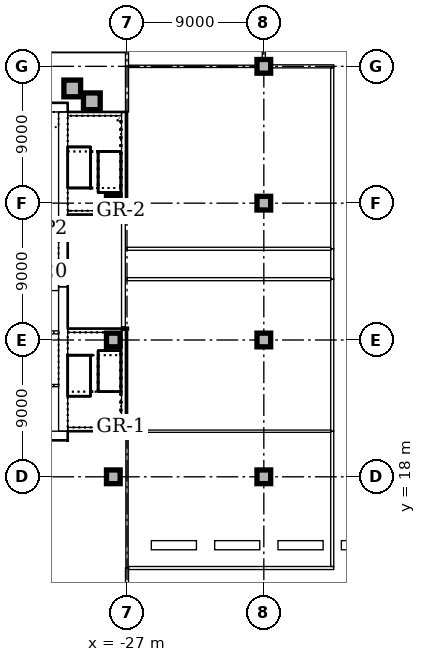
"""IFC4 building model, lengths in metres.
Left out: names, types, materials, properties, quantities, classifications, styles, units other than length and angle.
Written with IfcOpenShell. Run it as: python <this file> out.ifc"""

import sys

from ifc_helpers import new_model, si_unit, direction, frame, frame_2d, origin, origin_2d, place, context, subcontext, project, spatial, rectangle, extrude, element, fill, save


model = new_model("IFC4")
c1 = context("Model", 3, precision=1e-05, world=origin(), true_north=direction((0.0, 1.0)))
c2 = subcontext(c1, "Body", "Model", "MODEL_VIEW")
j1 = project(units=[si_unit("LENGTHUNIT", "METRE"), si_unit("PLANEANGLEUNIT", "RADIAN")], contexts=[c1])
p1 = place(None, origin())
s1 = spatial("IfcSite", under=j1, at=p1, CompositionType="ELEMENT")
p2 = place(p1, origin())
s2 = spatial("IfcBuilding", under=s1, at=p2, CompositionType="ELEMENT")
p3 = place(p2, origin())
s3 = spatial("IfcBuildingStorey", under=s2, at=p3, CompositionType="ELEMENT", Elevation=0.0)
for number, where, z_axis, x_axis in (
    (1, (-42.6, 20.7, 0.0), (0.0, 0.0, 1.0), (1.0, 0.0, 0.0)),
    (2, (-30.9, 42.3, 0.0), (0.0, 0.0, 1.0), (-1.0, 0.0, 0.0)),
):
    element("IfcWall", number, at=place(p3, frame(where, z_axis=z_axis, x_axis=x_axis)), inside=s3, PredefinedType="SOLIDWALL", context=c2, shape_type="SweptSolid", body=[
        extrude(rectangle(XDim=11.7, YDim=0.6, at=frame_2d((5.85, 0.0))), origin(), (0.0, 0.0, 1.0), 6.0),
    ])
p4 = place(p3, frame((-31.2, 21.0, 0.0), z_axis=(0.0, 0.0, 1.0), x_axis=(0.0, 1.0, 0.0)))
e3 = element("IfcWall", 3, at=p4, inside=s3, PredefinedType="SOLIDWALL", context=c2, shape_type="SweptSolid", body=[
    extrude(rectangle(XDim=9.5, YDim=0.6, at=frame_2d((4.75, 0.0))), origin(), (0.0, 0.0, 1.0), 6.0),
])
p5 = place(p4, frame((5.25, 0.0, 0.0)))
e4 = element("IfcOpeningElement", 4, at=p5, cuts=e3, PredefinedType="OPENING", context=c2, shape_type="SweptSolid", body=[
    extrude(rectangle(XDim=1.0, YDim=2.1, at=frame_2d((0.5, 1.05))), frame((0.0, 0.31, 0.0), z_axis=(0.0, -1.0, 0.0), x_axis=(1.0, 0.0, 0.0)), (0.0, 0.0, 1.0), 0.62),
])
p6 = place(p3, frame((-31.2, 30.5, 0.0), z_axis=(0.0, 0.0, 1.0), x_axis=(0.0, 1.0, 0.0)))
e5 = element("IfcWall", 5, at=p6, inside=s3, PredefinedType="SOLIDWALL", context=c2, shape_type="SweptSolid", body=[
    extrude(rectangle(XDim=11.5, YDim=0.6, at=frame_2d((5.75, 0.0))), origin(), (0.0, 0.0, 1.0), 6.0),
])
p7 = place(p6, frame((0.85, 0.0, 0.0)))
e6 = element("IfcOpeningElement", 6, at=p7, cuts=e5, PredefinedType="OPENING", context=c2, shape_type="SweptSolid", body=[
    extrude(rectangle(XDim=1.8, YDim=2.1, at=frame_2d((0.9, 1.05))), frame((0.0, 0.31, 0.0), z_axis=(0.0, -1.0, 0.0), x_axis=(1.0, 0.0, 0.0)), (0.0, 0.0, 1.0), 0.62),
])
p8 = place(p3, frame((-42.0, 30.5, 0.0), z_axis=(0.0, 0.0, 1.0), x_axis=(1.0, 0.0, 0.0)))
e7 = element("IfcWall", 7, at=p8, inside=s3, PredefinedType="SOLIDWALL", context=c2, shape_type="SweptSolid", body=[
    extrude(rectangle(XDim=10.5, YDim=0.5, at=frame_2d((5.25, 0.0))), origin(), (0.0, 0.0, 1.0), 6.0),
])
p9 = place(p3, frame((-30.9, 21.125, 0.0), z_axis=(0.0, 0.0, 1.0), x_axis=(1.0, 0.0, 0.0)))
e8 = element("IfcWall", 8, at=p9, inside=s3, PredefinedType="SOLIDWALL", context=c2, shape_type="SweptSolid", body=[
    extrude(rectangle(XDim=3.54, YDim=0.25, at=frame_2d((1.77, 0.0))), origin(), (0.0, 0.0, 1.0), 6.0),
])
p10 = place(p3, frame((-27.36, 27.625, 0.0), z_axis=(0.0, 0.0, 1.0), x_axis=(-1.0, 0.0, 0.0)))
e9 = element("IfcWall", 9, at=p10, inside=s3, PredefinedType="SOLIDWALL", context=c2, shape_type="SweptSolid", body=[
    extrude(rectangle(XDim=3.54, YDim=0.25, at=frame_2d((1.77, 0.0))), origin(), (0.0, 0.0, 1.0), 6.0),
])
p11 = place(p10, frame((1.69, 0.0, 0.0)))
e10 = element("IfcOpeningElement", 10, at=p11, cuts=e9, PredefinedType="OPENING", context=c2, shape_type="SweptSolid", body=[
    extrude(rectangle(XDim=1.1, YDim=2.1, at=frame_2d((0.55, 1.05))), frame((0.0, 0.135, 0.0), z_axis=(0.0, -1.0, 0.0), x_axis=(1.0, 0.0, 0.0)), (0.0, 0.0, 1.0), 0.27),
])
p12 = place(p3, frame((-30.9, 35.375, 0.0), z_axis=(0.0, 0.0, 1.0), x_axis=(1.0, 0.0, 0.0)))
e11 = element("IfcWall", 11, at=p12, inside=s3, PredefinedType="SOLIDWALL", context=c2, shape_type="SweptSolid", body=[
    extrude(rectangle(XDim=3.54, YDim=0.25, at=frame_2d((1.77, 0.0))), origin(), (0.0, 0.0, 1.0), 6.0),
])
p13 = place(p12, frame((0.75, 0.0, 0.0)))
e12 = element("IfcOpeningElement", 12, at=p13, cuts=e11, PredefinedType="OPENING", context=c2, shape_type="SweptSolid", body=[
    extrude(rectangle(XDim=1.1, YDim=2.1, at=frame_2d((0.55, 1.05))), frame((0.0, 0.135, 0.0), z_axis=(0.0, -1.0, 0.0), x_axis=(1.0, 0.0, 0.0)), (0.0, 0.0, 1.0), 0.27),
])
p14 = place(p3, frame((-27.36, 41.875, 0.0), z_axis=(0.0, 0.0, 1.0), x_axis=(-1.0, 0.0, 0.0)))
e13 = element("IfcWall", 13, at=p14, inside=s3, PredefinedType="SOLIDWALL", context=c2, shape_type="SweptSolid", body=[
    extrude(rectangle(XDim=3.54, YDim=0.25, at=frame_2d((1.77, 0.0))), origin(), (0.0, 0.0, 1.0), 6.0),
])
p15 = place(p3, frame((-27.235, 21.0, 0.0), z_axis=(0.0, 0.0, 1.0), x_axis=(0.0, 1.0, 0.0)))
e14 = element("IfcWall", 14, at=p15, inside=s3, PredefinedType="SOLIDWALL", context=c2, shape_type="SweptSolid", body=[
    extrude(rectangle(XDim=6.65, YDim=0.25, at=frame_2d((3.325, 0.0))), origin(), (0.0, 0.0, 1.0), 6.0),
])
p16 = place(p3, frame((-27.235, 27.85, 0.0), z_axis=(0.0, 0.0, 1.0), x_axis=(0.0, 1.0, 0.0)))
e15 = element("IfcWall", 15, at=p16, inside=s3, PredefinedType="SOLIDWALL", context=c2, shape_type="SweptSolid", body=[
    extrude(rectangle(XDim=7.3, YDim=0.25, at=frame_2d((3.65, 0.0))), origin(), (0.0, 0.0, 1.0), 6.0),
])
p17 = place(p16, frame((3.6, 0.0, 0.0)))
e16 = element("IfcOpeningElement", 16, at=p17, cuts=e15, PredefinedType="OPENING", context=c2, shape_type="SweptSolid", body=[
    extrude(rectangle(XDim=1.1, YDim=2.1, at=frame_2d((0.55, 1.05))), frame((0.0, 0.135, 0.0), z_axis=(0.0, -1.0, 0.0), x_axis=(1.0, 0.0, 0.0)), (0.0, 0.0, 1.0), 0.27),
])
p18 = place(p3, frame((-27.235, 35.35, 0.0), z_axis=(0.0, 0.0, 1.0), x_axis=(0.0, 1.0, 0.0)))
e17 = element("IfcWall", 17, at=p18, inside=s3, PredefinedType="SOLIDWALL", context=c2, shape_type="SweptSolid", body=[
    extrude(rectangle(XDim=6.65, YDim=0.25, at=frame_2d((3.325, 0.0))), origin(), (0.0, 0.0, 1.0), 6.0),
])
for number, where, z_axis, x_axis in (
    (18, (-29.313, 42.7, 0.0), (0.0, 0.0, 1.0), (1.0, 0.0, 0.0)),
    (19, (-30.602, 43.547, 0.0), (0.0, 0.0, 1.0), (1.0, 0.0, 0.0)),
):
    element("IfcColumn", number, at=place(p3, frame(where, z_axis=z_axis, x_axis=x_axis)), inside=s3, PredefinedType="COLUMN", context=c2, shape_type="SweptSolid", body=[
        extrude(rectangle(XDim=1.1, YDim=1.1, at=origin_2d()), origin(), (0.0, 0.0, 1.0), 5.7),
    ])
p19 = place(p3, frame((-27.9, 18.0, 0.0), z_axis=(0.0, 0.0, 1.0), x_axis=(1.0, 0.0, 0.0)))
e20 = element("IfcColumn", 20, at=p19, inside=s3, PredefinedType="COLUMN", context=c2, shape_type="SweptSolid", body=[
    extrude(rectangle(XDim=0.9, YDim=0.9, at=origin_2d()), origin(), (0.0, 0.0, 1.0), 5.7),
])
for number, where, z_axis, x_axis in (
    (21, (-27.9, 27.0, 0.0), (0.0, 0.0, 1.0), (1.0, 0.0, 0.0)),
    (22, (-27.9, 36.0, 0.0), (0.0, 0.0, 1.0), (1.0, 0.0, 0.0)),
):
    element("IfcColumn", number, at=place(p3, frame(where, z_axis=z_axis, x_axis=x_axis)), inside=s3, PredefinedType="COLUMN", context=c2, shape_type="SweptSolid", body=[
        extrude(rectangle(XDim=0.9, YDim=0.9, at=origin_2d()), origin(), (0.0, 0.0, 1.0), 6.0),
    ])
for number, where, z_axis, x_axis in (
    (23, (-18.0, 18.0, 0.0), (0.0, 0.0, 1.0), (1.0, 0.0, 0.0)),
    (24, (-18.0, 27.0, 0.0), (0.0, 0.0, 1.0), (1.0, 0.0, 0.0)),
    (25, (-18.0, 36.0, 0.0), (0.0, 0.0, 1.0), (1.0, 0.0, 0.0)),
    (26, (-18.0, 45.0, 0.0), (0.0, 0.0, 1.0), (1.0, 0.0, 0.0)),
):
    element("IfcColumn", number, at=place(p3, frame(where, z_axis=z_axis, x_axis=x_axis)), inside=s3, PredefinedType="COLUMN", context=c2, shape_type="SweptSolid", body=[
        extrude(rectangle(XDim=0.9, YDim=0.9, at=origin_2d()), origin(), (0.0, 0.0, 1.0), 5.7),
    ])
p20 = place(p3, frame((-26.9, 12.0, 0.0), z_axis=(0.0, 0.0, 1.0), x_axis=(1.0, 0.0, 0.0)))
e27 = element("IfcWall", 27, at=p20, inside=s3, PredefinedType="PARTITIONING", context=c2, shape_type="SweptSolid", body=[
    extrude(rectangle(XDim=13.5, YDim=0.2, at=frame_2d((6.75, 0.0))), origin(), (0.0, 0.0, 1.0), 5.7),
])
p21 = place(p20, frame((1.65, 0.0, 0.0)))
e28 = element("IfcOpeningElement", 28, at=p21, cuts=e27, PredefinedType="OPENING", context=c2, shape_type="SweptSolid", body=[
    extrude(rectangle(XDim=1.0, YDim=2.1, at=frame_2d((0.5, 1.05))), frame((0.0, 0.11, 0.0), z_axis=(0.0, -1.0, 0.0), x_axis=(1.0, 0.0, 0.0)), (0.0, 0.0, 1.0), 0.22),
])
p22 = place(p3, frame((-13.5, 12.1, 0.0), z_axis=(0.0, 0.0, 1.0), x_axis=(0.0, 1.0, 0.0)))
e29 = element("IfcWall", 29, at=p22, inside=s3, PredefinedType="PARTITIONING", context=c2, shape_type="SweptSolid", body=[
    extrude(rectangle(XDim=8.9, YDim=0.2, at=frame_2d((4.45, 0.0))), origin(), (0.0, 0.0, 1.0), 5.7),
])
p23 = place(p3, frame((-27.075, 21.0, 0.0), z_axis=(0.0, 0.0, 1.0), x_axis=(1.0, 0.0, 0.0)))
e30 = element("IfcWall", 30, at=p23, inside=s3, PredefinedType="PARTITIONING", context=c2, shape_type="SweptSolid", body=[
    extrude(rectangle(XDim=13.475, YDim=0.15, at=frame_2d((6.737, 0.0))), origin(), (0.0, 0.0, 1.0), 5.7),
])
p24 = place(p3, frame((-27.0, 12.0, 0.0), z_axis=(0.0, 0.0, 1.0), x_axis=(0.0, 1.0, 0.0)))
e31 = element("IfcWall", 31, at=p24, inside=s3, PredefinedType="PARTITIONING", context=c2, shape_type="SweptSolid", body=[
    extrude(rectangle(XDim=8.925, YDim=0.15, at=frame_2d((4.463, 0.0))), origin(), (0.0, 0.0, 1.0), 5.7),
])
p25 = place(p3, frame((-27.0, 3.7, 0.0), z_axis=(0.0, 0.0, 1.0), x_axis=(0.0, 1.0, 0.0)))
e32 = element("IfcWall", 32, at=p25, inside=s3, PredefinedType="PARTITIONING", context=c2, shape_type="SweptSolid", body=[
    extrude(rectangle(XDim=8.3, YDim=0.2, at=frame_2d((4.15, 0.0))), origin(), (0.0, 0.0, 1.0), 5.7),
])
p26 = place(p3, frame((-26.9, 45.0, 0.0), z_axis=(0.0, 0.0, 1.0), x_axis=(1.0, 0.0, 0.0)))
e33 = element("IfcWall", 33, at=p26, inside=s3, PredefinedType="PARTITIONING", context=c2, shape_type="SweptSolid", body=[
    extrude(rectangle(XDim=8.43, YDim=0.15, at=frame_2d((4.215, 0.0))), origin(), (0.0, 0.0, 1.0), 5.7),
])
p27 = place(p3, frame((-18.0, 45.47, 0.0), z_axis=(0.0, 0.0, 1.0), x_axis=(0.0, 1.0, 0.0)))
e34 = element("IfcWall", 34, at=p27, inside=s3, PredefinedType="PARTITIONING", context=c2, shape_type="SweptSolid", body=[
    extrude(rectangle(XDim=8.06, YDim=0.2, at=frame_2d((4.03, 0.0))), origin(), (0.0, 0.0, 1.0), 5.7),
])
p28 = place(p27, frame((5.03, 0.0, 0.0)))
e35 = element("IfcOpeningElement", 35, at=p28, cuts=e34, PredefinedType="OPENING", context=c2, shape_type="SweptSolid", body=[
    extrude(rectangle(XDim=1.0, YDim=2.1, at=frame_2d((0.5, 1.05))), frame((0.0, 0.11, 0.0), z_axis=(0.0, -1.0, 0.0), x_axis=(1.0, 0.0, 0.0)), (0.0, 0.0, 1.0), 0.22),
])
p29 = place(p3, frame((-27.0, 45.0, 0.0), z_axis=(0.0, 0.0, 1.0), x_axis=(0.0, 1.0, 0.0)))
e36 = element("IfcWall", 36, at=p29, inside=s3, PredefinedType="PARTITIONING", context=c2, shape_type="SweptSolid", body=[
    extrude(rectangle(XDim=1.0, YDim=0.2, at=frame_2d((0.5, 0.0))), origin(), (0.0, 0.0, 1.0), 5.7),
])
p30 = place(p3, frame((-13.5, 21.0, 0.0), z_axis=(0.0, 0.0, 1.0), x_axis=(0.0, 1.0, 0.0)))
e37 = element("IfcWall", 37, at=p30, inside=s3, PredefinedType="PARTITIONING", context=c2, shape_type="SweptSolid", body=[
    extrude(rectangle(XDim=10.0, YDim=0.2, at=frame_2d((5.0, 0.0))), origin(), (0.0, 0.0, 1.0), 5.7),
])
p31 = place(p30, frame((5.5, 0.0, 0.0)))
e38 = element("IfcOpeningElement", 38, at=p31, cuts=e37, PredefinedType="OPENING", context=c2, shape_type="SweptSolid", body=[
    extrude(rectangle(XDim=1.0, YDim=2.1, at=frame_2d((0.5, 1.05))), frame((0.0, 0.11, 0.0), z_axis=(0.0, -1.0, 0.0), x_axis=(1.0, 0.0, 0.0)), (0.0, 0.0, 1.0), 0.22),
])
p32 = place(p3, frame((-27.0, 31.0, 0.0), z_axis=(0.0, 0.0, 1.0), x_axis=(1.0, 0.0, 0.0)))
e39 = element("IfcWall", 39, at=p32, inside=s3, PredefinedType="SOLIDWALL", context=c2, shape_type="SweptSolid", body=[
    extrude(rectangle(XDim=13.4, YDim=0.2, at=frame_2d((6.7, 0.0))), origin(), (0.0, 0.0, 1.0), 5.7),
])
p33 = place(p3, frame((-17.53, 45.0, 0.0), z_axis=(0.0, 0.0, 1.0), x_axis=(1.0, 0.0, 0.0)))
e40 = element("IfcWall", 40, at=p33, inside=s3, PredefinedType="PARTITIONING", context=c2, shape_type="SweptSolid", body=[
    extrude(rectangle(XDim=4.13, YDim=0.2, at=frame_2d((2.065, 0.0))), origin(), (0.0, 0.0, 1.0), 5.7),
])
p34 = place(p3, frame((-13.5, 33.0, 0.0), z_axis=(0.0, 0.0, 1.0), x_axis=(0.0, 1.0, 0.0)))
e41 = element("IfcWall", 41, at=p34, inside=s3, PredefinedType="PARTITIONING", context=c2, shape_type="SweptSolid", body=[
    extrude(rectangle(XDim=11.9, YDim=0.2, at=frame_2d((5.95, 0.0))), origin(), (0.0, 0.0, 1.0), 5.7),
])
p35 = place(p34, frame((7.75, 0.0, 0.0)))
e42 = element("IfcOpeningElement", 42, at=p35, cuts=e41, PredefinedType="OPENING", context=c2, shape_type="SweptSolid", body=[
    extrude(rectangle(XDim=1.0, YDim=2.1, at=frame_2d((0.5, 1.05))), frame((0.0, 0.11, 0.0), z_axis=(0.0, -1.0, 0.0), x_axis=(1.0, 0.0, 0.0)), (0.0, 0.0, 1.0), 0.22),
])
p36 = place(p3, frame((-27.0, 42.0, 0.0), z_axis=(0.0, 0.0, 1.0), x_axis=(0.0, 1.0, 0.0)))
e43 = element("IfcWall", 43, at=p36, inside=s3, PredefinedType="PARTITIONING", context=c2, shape_type="SweptSolid", body=[
    extrude(rectangle(XDim=3.0, YDim=0.2, at=frame_2d((1.5, 0.0))), origin(), (0.0, 0.0, 1.0), 5.7),
])
p37 = place(p3, frame((-27.0, 33.0, 0.0), z_axis=(0.0, 0.0, 1.0), x_axis=(1.0, 0.0, 0.0)))
e44 = element("IfcWall", 44, at=p37, inside=s3, PredefinedType="SOLIDWALL", context=c2, shape_type="SweptSolid", body=[
    extrude(rectangle(XDim=13.4, YDim=0.2, at=frame_2d((6.7, 0.0))), origin(), (0.0, 0.0, 1.0), 5.7),
])
p38 = place(p3, frame((-13.5, 31.0, 0.0), z_axis=(0.0, 0.0, 1.0), x_axis=(0.0, 1.0, 0.0)))
e45 = element("IfcWall", 45, at=p38, inside=s3, PredefinedType="SOLIDWALL", context=c2, shape_type="SweptSolid", body=[
    extrude(rectangle(XDim=2.0, YDim=0.2, at=frame_2d((1.0, 0.0))), origin(), (0.0, 0.0, 1.0), 5.7),
])
p39 = place(p38, frame((0.4, 0.0, 0.0)))
e46 = element("IfcOpeningElement", 46, at=p39, cuts=e45, PredefinedType="OPENING", context=c2, shape_type="SweptSolid", body=[
    extrude(rectangle(XDim=1.2, YDim=2.1, at=frame_2d((0.6, 1.05))), frame((0.0, 0.11, 0.0), z_axis=(0.0, -1.0, 0.0), x_axis=(1.0, 0.0, 0.0)), (0.0, 0.0, 1.0), 0.22),
])
p40 = place(p3, frame((-36.0, 46.0, 0.0), z_axis=(0.0, 0.0, 1.0), x_axis=(1.0, 0.0, 0.0)))
e47 = element("IfcWall", 47, at=p40, inside=s3, PredefinedType="PARTITIONING", context=c2, shape_type="SweptSolid", body=[
    extrude(rectangle(XDim=8.9, YDim=0.2, at=frame_2d((4.45, 0.0))), origin(), (0.0, 0.0, 1.0), 5.7),
])
p41 = place(p40, frame((4.0, 0.0, 0.0)))
e48 = element("IfcOpeningElement", 48, at=p41, cuts=e47, PredefinedType="OPENING", context=c2, shape_type="SweptSolid", body=[
    extrude(rectangle(XDim=1.0, YDim=2.1, at=frame_2d((0.5, 1.05))), frame((0.0, 0.11, 0.0), z_axis=(0.0, -1.0, 0.0), x_axis=(1.0, 0.0, 0.0)), (0.0, 0.0, 1.0), 0.22),
])
p42 = place(p3, frame((-25.4, 13.5, 0.0), z_axis=(0.0, 0.0, 1.0), x_axis=(1.0, 0.0, 0.0)))
e49 = element("IfcWall", 49, at=p42, inside=s3, PredefinedType="MOVABLE", context=c2, shape_type="SweptSolid", body=[
    extrude(rectangle(XDim=2.967, YDim=0.6, at=frame_2d((1.483, 0.0))), origin(), (0.0, 0.0, 1.0), 1.1),
])
p43 = place(p3, frame((-21.233, 13.5, 0.0), z_axis=(0.0, 0.0, 1.0), x_axis=(1.0, 0.0, 0.0)))
e50 = element("IfcWall", 50, at=p43, inside=s3, PredefinedType="MOVABLE", context=c2, shape_type="SweptSolid", body=[
    extrude(rectangle(XDim=2.967, YDim=0.6, at=frame_2d((1.483, 0.0))), origin(), (0.0, 0.0, 1.0), 1.1),
])
for number, where, z_axis, x_axis in (
    (51, (-17.067, 13.5, 0.0), (0.0, 0.0, 1.0), (1.0, 0.0, 0.0)),
    (52, (-12.9, 13.5, 0.0), (0.0, 0.0, 1.0), (1.0, 0.0, 0.0)),
):
    element("IfcWall", number, at=place(p3, frame(where, z_axis=z_axis, x_axis=x_axis)), inside=s3, PredefinedType="MOVABLE", context=c2, shape_type="SweptSolid", body=[
        extrude(rectangle(XDim=2.967, YDim=0.6, at=frame_2d((1.483, 0.0))), origin(), (0.0, 0.0, 1.0), 1.1),
    ])
p44 = place(p3, frame((-34.9, 27.5, 0.0), z_axis=(0.0, 0.0, 1.0), x_axis=(1.0, 0.0, 0.0)))
e53 = element("IfcWall", 53, at=p44, inside=s3, PredefinedType="SOLIDWALL", context=c2, shape_type="SweptSolid", body=[
    extrude(rectangle(XDim=3.4, YDim=0.2, at=frame_2d((1.7, 0.0))), origin(), (0.0, 0.0, 1.0), 6.0),
])
p45 = place(p44, frame((1.1, 0.0, 0.0)))
e54 = element("IfcOpeningElement", 54, at=p45, cuts=e53, PredefinedType="OPENING", context=c2, shape_type="SweptSolid", body=[
    extrude(rectangle(XDim=1.1, YDim=2.1, at=frame_2d((0.55, 1.05))), frame((0.0, 0.11, 0.0), z_axis=(0.0, -1.0, 0.0), x_axis=(1.0, 0.0, 0.0)), (0.0, 0.0, 1.0), 0.22),
])
for number, where, z_axis, x_axis in (
    (55, (-27.36, 27.75, 0.0), (0.0, 0.0, 1.0), (1.0, 0.0, 0.0)),
    (56, (-26.9, 35.25, 0.0), (0.0, 0.0, 1.0), (-1.0, 0.0, 0.0)),
):
    element("IfcWall", number, at=place(p3, frame(where, z_axis=z_axis, x_axis=x_axis)), inside=s3, PredefinedType="SOLIDWALL", context=c2, shape_type="SweptSolid", body=[
        extrude(rectangle(XDim=0.46, YDim=0.2, at=frame_2d((0.23, 0.0))), origin(), (0.0, 0.0, 1.0), 6.0),
    ])
p46 = place(p3, frame((-31.5, 24.0, 0.0), z_axis=(0.0, 0.0, 1.0), x_axis=(-1.0, 0.0, 0.0)))
e57 = element("IfcWall", 57, at=p46, inside=s3, PredefinedType="SOLIDWALL", context=c2, shape_type="SweptSolid", body=[
    extrude(rectangle(XDim=3.4, YDim=0.15, at=frame_2d((1.7, 0.0))), origin(), (0.0, 0.0, 1.0), 6.0),
])
p47 = place(p3, frame((-34.075, 34.0, 0.0), z_axis=(0.0, 0.0, 1.0), x_axis=(1.0, 0.0, 0.0)))
e58 = element("IfcWall", 58, at=p47, inside=s3, PredefinedType="SOLIDWALL", context=c2, shape_type="SweptSolid", body=[
    extrude(rectangle(XDim=2.575, YDim=0.15, at=frame_2d((1.288, 0.0))), origin(), (0.0, 0.0, 1.0), 6.0),
])
p48 = place(p21, origin())
e59 = element("IfcDoor", 59, at=p48, inside=s3, OperationType="SINGLE_SWING_RIGHT", PredefinedType="DOOR", context=c2, shape_type="SweptSolid", body=[
    extrude(rectangle(XDim=1.0, YDim=2.1, at=frame_2d((0.5, 1.05))), frame((0.0, 0.025, 0.0), z_axis=(0.0, -1.0, 0.0), x_axis=(1.0, 0.0, 0.0)), (0.0, 0.0, 1.0), 0.05),
])
fill(e28, e59)
p49 = place(p31, origin())
e60 = element("IfcDoor", 60, at=p49, inside=s3, OperationType="SINGLE_SWING_RIGHT", PredefinedType="DOOR", context=c2, shape_type="SweptSolid", body=[
    extrude(rectangle(XDim=1.0, YDim=2.1, at=frame_2d((0.5, 1.05))), frame((0.0, 0.025, 0.0), z_axis=(0.0, -1.0, 0.0), x_axis=(1.0, 0.0, 0.0)), (0.0, 0.0, 1.0), 0.05),
])
fill(e38, e60)
p50 = place(p35, origin())
e61 = element("IfcDoor", 61, at=p50, inside=s3, OperationType="SINGLE_SWING_LEFT", PredefinedType="DOOR", context=c2, shape_type="SweptSolid", body=[
    extrude(rectangle(XDim=1.0, YDim=2.1, at=frame_2d((0.5, 1.05))), frame((0.0, 0.025, 0.0), z_axis=(0.0, -1.0, 0.0), x_axis=(1.0, 0.0, 0.0)), (0.0, 0.0, 1.0), 0.05),
])
fill(e42, e61)
p51 = place(p39, frame((1.2, 0.0, 0.0), z_axis=(0.0, 0.0, 1.0), x_axis=(-1.0, 0.0, 0.0)))
e62 = element("IfcDoor", 62, at=p51, inside=s3, OperationType="SINGLE_SWING_RIGHT", PredefinedType="DOOR", context=c2, shape_type="SweptSolid", body=[
    extrude(rectangle(XDim=1.2, YDim=2.1, at=frame_2d((0.6, 1.05))), frame((0.0, 0.025, 0.0), z_axis=(0.0, -1.0, 0.0), x_axis=(1.0, 0.0, 0.0)), (0.0, 0.0, 1.0), 0.05),
])
fill(e46, e62)
p52 = place(p5, frame((1.0, 0.0, 0.0), z_axis=(0.0, 0.0, 1.0), x_axis=(-1.0, 0.0, 0.0)))
e63 = element("IfcDoor", 63, at=p52, inside=s3, OperationType="SINGLE_SWING_LEFT", PredefinedType="DOOR", context=c2, shape_type="SweptSolid", body=[
    extrude(rectangle(XDim=1.0, YDim=2.1, at=frame_2d((0.5, 1.05))), frame((0.0, 0.025, 0.0), z_axis=(0.0, -1.0, 0.0), x_axis=(1.0, 0.0, 0.0)), (0.0, 0.0, 1.0), 0.05),
])
fill(e4, e63)
p53 = place(p11, origin())
e64 = element("IfcDoor", 64, at=p53, inside=s3, OperationType="SINGLE_SWING_RIGHT", PredefinedType="DOOR", context=c2, shape_type="SweptSolid", body=[
    extrude(rectangle(XDim=1.1, YDim=2.1, at=frame_2d((0.55, 1.05))), frame((0.0, 0.025, 0.0), z_axis=(0.0, -1.0, 0.0), x_axis=(1.0, 0.0, 0.0)), (0.0, 0.0, 1.0), 0.05),
])
fill(e10, e64)
p54 = place(p13, origin())
e65 = element("IfcDoor", 65, at=p54, inside=s3, OperationType="SINGLE_SWING_LEFT", PredefinedType="DOOR", context=c2, shape_type="SweptSolid", body=[
    extrude(rectangle(XDim=1.1, YDim=2.1, at=frame_2d((0.55, 1.05))), frame((0.0, 0.025, 0.0), z_axis=(0.0, -1.0, 0.0), x_axis=(1.0, 0.0, 0.0)), (0.0, 0.0, 1.0), 0.05),
])
fill(e12, e65)
p55 = place(p7, origin())
e66 = element("IfcDoor", 66, at=p55, inside=s3, OperationType="DOUBLE_DOOR_SINGLE_SWING", PredefinedType="DOOR", context=c2, shape_type="SweptSolid", body=[
    extrude(rectangle(XDim=1.8, YDim=2.1, at=frame_2d((0.9, 1.05))), frame((0.0, 0.025, 0.0), z_axis=(0.0, -1.0, 0.0), x_axis=(1.0, 0.0, 0.0)), (0.0, 0.0, 1.0), 0.05),
])
fill(e6, e66)
p56 = place(p17, origin())
e67 = element("IfcDoor", 67, at=p56, inside=s3, OperationType="SINGLE_SWING_LEFT", PredefinedType="DOOR", context=c2, shape_type="SweptSolid", body=[
    extrude(rectangle(XDim=1.1, YDim=2.1, at=frame_2d((0.55, 1.05))), frame((0.0, 0.025, 0.0), z_axis=(0.0, -1.0, 0.0), x_axis=(1.0, 0.0, 0.0)), (0.0, 0.0, 1.0), 0.05),
])
fill(e16, e67)
save(model, sys.argv[1])
